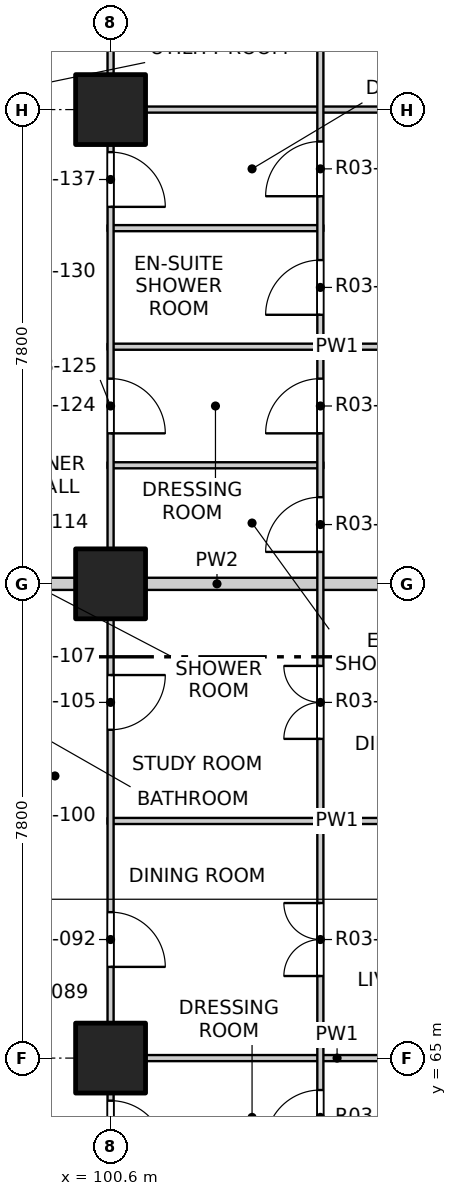
"""IFC4 building model, lengths in metres.
Left out: names, types, materials, properties, quantities, classifications, styles, units other than length and angle.
Written with IfcOpenShell. Run it as: python <this file> out.ifc"""

import sys

from ifc_helpers import new_model, si_unit, direction, frame, frame_2d, origin, origin_2d, place, context, subcontext, project, spatial, rectangle, extrude, element, fill, save


model = new_model("IFC4")
c1 = context("Model", 3, precision=1e-05, world=origin(), true_north=direction((0.0, 1.0)))
c2 = subcontext(c1, "Body", "Model", "MODEL_VIEW")
j1 = project(units=[si_unit("LENGTHUNIT", "METRE"), si_unit("PLANEANGLEUNIT", "RADIAN")], contexts=[c1])
p1 = place(None, origin())
s1 = spatial("IfcSite", under=j1, at=p1, CompositionType="ELEMENT")
p2 = place(p1, origin())
s2 = spatial("IfcBuilding", under=s1, at=p2, CompositionType="ELEMENT")
p3 = place(p2, frame((0.0, 0.0, 43.3)))
s3 = spatial("IfcBuildingStorey", under=s2, at=p3, CompositionType="ELEMENT", Elevation=43.3)
for number, where, z_axis, x_axis in (
    (1, (100.6, 65.0, -0.25), (0.0, 0.0, 1.0), (1.0, 0.0, 0.0)),
    (2, (100.6, 72.8, -0.25), (0.0, 0.0, 1.0), (1.0, 0.0, 0.0)),
    (3, (100.6, 80.6, -0.25), (0.0, 0.0, 1.0), (1.0, 0.0, 0.0)),
):
    element("IfcColumn", number, at=place(p3, frame(where, z_axis=z_axis, x_axis=x_axis)), inside=s3, PredefinedType="COLUMN", context=c2, shape_type="SweptSolid", body=[
        extrude(rectangle(XDim=1.15, YDim=1.15, at=origin_2d()), origin(), (0.0, 0.0, 1.0), 3.35),
    ])
for number, where, z_axis, x_axis in (
    (4, (100.55, 65.0, 0.0), (0.0, 0.0, 1.0), (1.0, 0.0, 0.0)),
    (5, (100.55, 68.9, 0.0), (0.0, 0.0, 1.0), (1.0, 0.0, 0.0)),
):
    element("IfcWall", number, at=place(p3, frame(where, z_axis=z_axis, x_axis=x_axis)), inside=s3, PredefinedType="PARTITIONING", context=c2, shape_type="SweptSolid", body=[
        extrude(rectangle(XDim=7.55, YDim=0.1, at=frame_2d((3.775, 0.0))), origin(), (0.0, 0.0, 1.0), 3.1),
    ])
p4 = place(p3, frame((96.6, 72.8, 0.0), z_axis=(0.0, 0.0, 1.0), x_axis=(1.0, 0.0, 0.0)))
e6 = element("IfcWall", 6, at=p4, inside=s3, PredefinedType="PARTITIONING", context=c2, shape_type="SweptSolid", body=[
    extrude(rectangle(XDim=11.5, YDim=0.2, at=frame_2d((5.75, 0.0))), origin(), (0.0, 0.0, 1.0), 3.1),
])
p5 = place(p3, frame((100.55, 74.75, 0.0), z_axis=(0.0, 0.0, 1.0), x_axis=(1.0, 0.0, 0.0)))
e7 = element("IfcWall", 7, at=p5, inside=s3, PredefinedType="PARTITIONING", context=c2, shape_type="SweptSolid", body=[
    extrude(rectangle(XDim=3.55, YDim=0.1, at=frame_2d((1.775, 0.0))), origin(), (0.0, 0.0, 1.0), 3.1),
])
p6 = place(p3, frame((100.55, 76.7, 0.0), z_axis=(0.0, 0.0, 1.0), x_axis=(1.0, 0.0, 0.0)))
e8 = element("IfcWall", 8, at=p6, inside=s3, PredefinedType="PARTITIONING", context=c2, shape_type="SweptSolid", body=[
    extrude(rectangle(XDim=7.55, YDim=0.1, at=frame_2d((3.775, 0.0))), origin(), (0.0, 0.0, 1.0), 3.1),
])
p7 = place(p3, frame((100.55, 78.65, 0.0), z_axis=(0.0, 0.0, 1.0), x_axis=(1.0, 0.0, 0.0)))
e9 = element("IfcWall", 9, at=p7, inside=s3, PredefinedType="PARTITIONING", context=c2, shape_type="SweptSolid", body=[
    extrude(rectangle(XDim=3.55, YDim=0.1, at=frame_2d((1.775, 0.0))), origin(), (0.0, 0.0, 1.0), 3.1),
])
p8 = place(p3, frame((100.55, 80.6, 0.0), z_axis=(0.0, 0.0, 1.0), x_axis=(1.0, 0.0, 0.0)))
e10 = element("IfcWall", 10, at=p8, inside=s3, PredefinedType="PARTITIONING", context=c2, shape_type="SweptSolid", body=[
    extrude(rectangle(XDim=7.55, YDim=0.1, at=frame_2d((3.775, 0.0))), origin(), (0.0, 0.0, 1.0), 3.1),
])
p9 = place(p3, frame((100.6, 41.9, 0.0), z_axis=(0.0, 0.0, 1.0), x_axis=(0.0, 1.0, 0.0)))
e11 = element("IfcWall", 11, at=p9, inside=s3, PredefinedType="PARTITIONING", context=c2, shape_type="SweptSolid", body=[
    extrude(rectangle(XDim=46.2, YDim=0.1, at=frame_2d((23.1, 0.0))), origin(), (0.0, 0.0, 1.0), 3.1),
])
p10 = place(p9, frame((1.2, 0.0, 0.0)))
e12 = element("IfcOpeningElement", 12, at=p10, cuts=e11, PredefinedType="OPENING", context=c2, shape_type="SweptSolid", body=[
    extrude(rectangle(XDim=0.9, YDim=2.1, at=frame_2d((0.45, 1.05))), frame((0.0, 0.06, 0.0), z_axis=(0.0, -1.0, 0.0), x_axis=(1.0, 0.0, 0.0)), (0.0, 0.0, 1.0), 0.12),
])
p11 = place(p9, frame((5.9, 0.0, 0.0)))
e13 = element("IfcOpeningElement", 13, at=p11, cuts=e11, PredefinedType="OPENING", context=c2, shape_type="SweptSolid", body=[
    extrude(rectangle(XDim=0.9, YDim=2.1, at=frame_2d((0.45, 1.05))), frame((0.0, 0.06, 0.0), z_axis=(0.0, -1.0, 0.0), x_axis=(1.0, 0.0, 0.0)), (0.0, 0.0, 1.0), 0.12),
])
p12 = place(p9, frame((9.0, 0.0, 0.0)))
e14 = element("IfcOpeningElement", 14, at=p12, cuts=e11, PredefinedType="OPENING", context=c2, shape_type="SweptSolid", body=[
    extrude(rectangle(XDim=0.9, YDim=2.1, at=frame_2d((0.45, 1.05))), frame((0.0, 0.06, 0.0), z_axis=(0.0, -1.0, 0.0), x_axis=(1.0, 0.0, 0.0)), (0.0, 0.0, 1.0), 0.12),
])
p13 = place(p9, frame((13.725, 0.0, 0.0)))
e15 = element("IfcOpeningElement", 15, at=p13, cuts=e11, PredefinedType="OPENING", context=c2, shape_type="SweptSolid", body=[
    extrude(rectangle(XDim=0.9, YDim=2.1, at=frame_2d((0.45, 1.05))), frame((0.0, 0.06, 0.0), z_axis=(0.0, -1.0, 0.0), x_axis=(1.0, 0.0, 0.0)), (0.0, 0.0, 1.0), 0.12),
])
p14 = place(p9, frame((17.775, 0.0, 0.0)))
e16 = element("IfcOpeningElement", 16, at=p14, cuts=e11, PredefinedType="OPENING", context=c2, shape_type="SweptSolid", body=[
    extrude(rectangle(XDim=0.9, YDim=2.1, at=frame_2d((0.45, 1.05))), frame((0.0, 0.06, 0.0), z_axis=(0.0, -1.0, 0.0), x_axis=(1.0, 0.0, 0.0)), (0.0, 0.0, 1.0), 0.12),
])
p15 = place(p9, frame((21.5, 0.0, 0.0)))
e17 = element("IfcOpeningElement", 17, at=p15, cuts=e11, PredefinedType="OPENING", context=c2, shape_type="SweptSolid", body=[
    extrude(rectangle(XDim=0.9, YDim=2.1, at=frame_2d((0.45, 1.05))), frame((0.0, 0.06, 0.0), z_axis=(0.0, -1.0, 0.0), x_axis=(1.0, 0.0, 0.0)), (0.0, 0.0, 1.0), 0.12),
])
p16 = place(p9, frame((24.6, 0.0, 0.0)))
e18 = element("IfcOpeningElement", 18, at=p16, cuts=e11, PredefinedType="OPENING", context=c2, shape_type="SweptSolid", body=[
    extrude(rectangle(XDim=0.9, YDim=2.1, at=frame_2d((0.45, 1.05))), frame((0.0, 0.06, 0.0), z_axis=(0.0, -1.0, 0.0), x_axis=(1.0, 0.0, 0.0)), (0.0, 0.0, 1.0), 0.12),
])
p17 = place(p9, frame((28.5, 0.0, 0.0)))
e19 = element("IfcOpeningElement", 19, at=p17, cuts=e11, PredefinedType="OPENING", context=c2, shape_type="SweptSolid", body=[
    extrude(rectangle(XDim=0.9, YDim=2.1, at=frame_2d((0.45, 1.05))), frame((0.0, 0.06, 0.0), z_axis=(0.0, -1.0, 0.0), x_axis=(1.0, 0.0, 0.0)), (0.0, 0.0, 1.0), 0.12),
])
p18 = place(p9, frame((33.375, 0.0, 0.0)))
e20 = element("IfcOpeningElement", 20, at=p18, cuts=e11, PredefinedType="OPENING", context=c2, shape_type="SweptSolid", body=[
    extrude(rectangle(XDim=0.9, YDim=2.1, at=frame_2d((0.45, 1.05))), frame((0.0, 0.06, 0.0), z_axis=(0.0, -1.0, 0.0), x_axis=(1.0, 0.0, 0.0)), (0.0, 0.0, 1.0), 0.12),
])
p19 = place(p9, frame((37.1, 0.0, 0.0)))
e21 = element("IfcOpeningElement", 21, at=p19, cuts=e11, PredefinedType="OPENING", context=c2, shape_type="SweptSolid", body=[
    extrude(rectangle(XDim=0.9, YDim=2.1, at=frame_2d((0.45, 1.05))), frame((0.0, 0.06, 0.0), z_axis=(0.0, -1.0, 0.0), x_axis=(1.0, 0.0, 0.0)), (0.0, 0.0, 1.0), 0.12),
])
p20 = place(p9, frame((40.2, 0.0, 0.0)))
e22 = element("IfcOpeningElement", 22, at=p20, cuts=e11, PredefinedType="OPENING", context=c2, shape_type="SweptSolid", body=[
    extrude(rectangle(XDim=0.9, YDim=2.1, at=frame_2d((0.45, 1.05))), frame((0.0, 0.06, 0.0), z_axis=(0.0, -1.0, 0.0), x_axis=(1.0, 0.0, 0.0)), (0.0, 0.0, 1.0), 0.12),
])
p21 = place(p9, frame((44.1, 0.0, 0.0)))
e23 = element("IfcOpeningElement", 23, at=p21, cuts=e11, PredefinedType="OPENING", context=c2, shape_type="SweptSolid", body=[
    extrude(rectangle(XDim=0.9, YDim=2.1, at=frame_2d((0.45, 1.05))), frame((0.0, 0.06, 0.0), z_axis=(0.0, -1.0, 0.0), x_axis=(1.0, 0.0, 0.0)), (0.0, 0.0, 1.0), 0.12),
])
p22 = place(p3, frame((104.05, 41.9, 0.0), z_axis=(0.0, 0.0, 1.0), x_axis=(0.0, 1.0, 0.0)))
e24 = element("IfcWall", 24, at=p22, inside=s3, PredefinedType="PARTITIONING", context=c2, shape_type="SweptSolid", body=[
    extrude(rectangle(XDim=46.2, YDim=0.1, at=frame_2d((23.1, 0.0))), origin(), (0.0, 0.0, 1.0), 3.1),
])
p23 = place(p22, frame((1.05, 0.0, 0.0)))
e25 = element("IfcOpeningElement", 25, at=p23, cuts=e24, PredefinedType="OPENING", context=c2, shape_type="SweptSolid", body=[
    extrude(rectangle(XDim=1.2, YDim=2.1, at=frame_2d((0.6, 1.05))), frame((0.0, 0.06, 0.0), z_axis=(0.0, -1.0, 0.0), x_axis=(1.0, 0.0, 0.0)), (0.0, 0.0, 1.0), 0.12),
])
p24 = place(p22, frame((4.125, 0.0, 0.0)))
e26 = element("IfcOpeningElement", 26, at=p24, cuts=e24, PredefinedType="OPENING", context=c2, shape_type="SweptSolid", body=[
    extrude(rectangle(XDim=0.9, YDim=2.1, at=frame_2d((0.45, 1.05))), frame((0.0, 0.06, 0.0), z_axis=(0.0, -1.0, 0.0), x_axis=(1.0, 0.0, 0.0)), (0.0, 0.0, 1.0), 0.12),
])
p25 = place(p22, frame((6.075, 0.0, 0.0)))
e27 = element("IfcOpeningElement", 27, at=p25, cuts=e24, PredefinedType="OPENING", context=c2, shape_type="SweptSolid", body=[
    extrude(rectangle(XDim=0.9, YDim=2.1, at=frame_2d((0.45, 1.05))), frame((0.0, 0.06, 0.0), z_axis=(0.0, -1.0, 0.0), x_axis=(1.0, 0.0, 0.0)), (0.0, 0.0, 1.0), 0.12),
])
p26 = place(p22, frame((8.85, 0.0, 0.0)))
e28 = element("IfcOpeningElement", 28, at=p26, cuts=e24, PredefinedType="OPENING", context=c2, shape_type="SweptSolid", body=[
    extrude(rectangle(XDim=1.2, YDim=2.1, at=frame_2d((0.6, 1.05))), frame((0.0, 0.06, 0.0), z_axis=(0.0, -1.0, 0.0), x_axis=(1.0, 0.0, 0.0)), (0.0, 0.0, 1.0), 0.12),
])
p27 = place(p22, frame((11.925, 0.0, 0.0)))
e29 = element("IfcOpeningElement", 29, at=p27, cuts=e24, PredefinedType="OPENING", context=c2, shape_type="SweptSolid", body=[
    extrude(rectangle(XDim=0.9, YDim=2.1, at=frame_2d((0.45, 1.05))), frame((0.0, 0.06, 0.0), z_axis=(0.0, -1.0, 0.0), x_axis=(1.0, 0.0, 0.0)), (0.0, 0.0, 1.0), 0.12),
])
p28 = place(p22, frame((13.875, 0.0, 0.0)))
e30 = element("IfcOpeningElement", 30, at=p28, cuts=e24, PredefinedType="OPENING", context=c2, shape_type="SweptSolid", body=[
    extrude(rectangle(XDim=0.9, YDim=2.1, at=frame_2d((0.45, 1.05))), frame((0.0, 0.06, 0.0), z_axis=(0.0, -1.0, 0.0), x_axis=(1.0, 0.0, 0.0)), (0.0, 0.0, 1.0), 0.12),
])
p29 = place(p22, frame((15.825, 0.0, 0.0)))
e31 = element("IfcOpeningElement", 31, at=p29, cuts=e24, PredefinedType="OPENING", context=c2, shape_type="SweptSolid", body=[
    extrude(rectangle(XDim=0.9, YDim=2.1, at=frame_2d((0.45, 1.05))), frame((0.0, 0.06, 0.0), z_axis=(0.0, -1.0, 0.0), x_axis=(1.0, 0.0, 0.0)), (0.0, 0.0, 1.0), 0.12),
])
p30 = place(p22, frame((17.775, 0.0, 0.0)))
e32 = element("IfcOpeningElement", 32, at=p30, cuts=e24, PredefinedType="OPENING", context=c2, shape_type="SweptSolid", body=[
    extrude(rectangle(XDim=0.9, YDim=2.1, at=frame_2d((0.45, 1.05))), frame((0.0, 0.06, 0.0), z_axis=(0.0, -1.0, 0.0), x_axis=(1.0, 0.0, 0.0)), (0.0, 0.0, 1.0), 0.12),
])
p31 = place(p22, frame((19.725, 0.0, 0.0)))
e33 = element("IfcOpeningElement", 33, at=p31, cuts=e24, PredefinedType="OPENING", context=c2, shape_type="SweptSolid", body=[
    extrude(rectangle(XDim=0.9, YDim=2.1, at=frame_2d((0.45, 1.05))), frame((0.0, 0.06, 0.0), z_axis=(0.0, -1.0, 0.0), x_axis=(1.0, 0.0, 0.0)), (0.0, 0.0, 1.0), 0.12),
])
p32 = place(p22, frame((21.675, 0.0, 0.0)))
e34 = element("IfcOpeningElement", 34, at=p32, cuts=e24, PredefinedType="OPENING", context=c2, shape_type="SweptSolid", body=[
    extrude(rectangle(XDim=0.9, YDim=2.1, at=frame_2d((0.45, 1.05))), frame((0.0, 0.06, 0.0), z_axis=(0.0, -1.0, 0.0), x_axis=(1.0, 0.0, 0.0)), (0.0, 0.0, 1.0), 0.12),
])
p33 = place(p22, frame((24.45, 0.0, 0.0)))
e35 = element("IfcOpeningElement", 35, at=p33, cuts=e24, PredefinedType="OPENING", context=c2, shape_type="SweptSolid", body=[
    extrude(rectangle(XDim=1.2, YDim=2.1, at=frame_2d((0.6, 1.05))), frame((0.0, 0.06, 0.0), z_axis=(0.0, -1.0, 0.0), x_axis=(1.0, 0.0, 0.0)), (0.0, 0.0, 1.0), 0.12),
])
p34 = place(p22, frame((28.35, 0.0, 0.0)))
e36 = element("IfcOpeningElement", 36, at=p34, cuts=e24, PredefinedType="OPENING", context=c2, shape_type="SweptSolid", body=[
    extrude(rectangle(XDim=1.2, YDim=2.1, at=frame_2d((0.6, 1.05))), frame((0.0, 0.06, 0.0), z_axis=(0.0, -1.0, 0.0), x_axis=(1.0, 0.0, 0.0)), (0.0, 0.0, 1.0), 0.12),
])
p35 = place(p22, frame((31.425, 0.0, 0.0)))
e37 = element("IfcOpeningElement", 37, at=p35, cuts=e24, PredefinedType="OPENING", context=c2, shape_type="SweptSolid", body=[
    extrude(rectangle(XDim=0.9, YDim=2.1, at=frame_2d((0.45, 1.05))), frame((0.0, 0.06, 0.0), z_axis=(0.0, -1.0, 0.0), x_axis=(1.0, 0.0, 0.0)), (0.0, 0.0, 1.0), 0.12),
])
p36 = place(p22, frame((33.375, 0.0, 0.0)))
e38 = element("IfcOpeningElement", 38, at=p36, cuts=e24, PredefinedType="OPENING", context=c2, shape_type="SweptSolid", body=[
    extrude(rectangle(XDim=0.9, YDim=2.1, at=frame_2d((0.45, 1.05))), frame((0.0, 0.06, 0.0), z_axis=(0.0, -1.0, 0.0), x_axis=(1.0, 0.0, 0.0)), (0.0, 0.0, 1.0), 0.12),
])
p37 = place(p22, frame((35.325, 0.0, 0.0)))
e39 = element("IfcOpeningElement", 39, at=p37, cuts=e24, PredefinedType="OPENING", context=c2, shape_type="SweptSolid", body=[
    extrude(rectangle(XDim=0.9, YDim=2.1, at=frame_2d((0.45, 1.05))), frame((0.0, 0.06, 0.0), z_axis=(0.0, -1.0, 0.0), x_axis=(1.0, 0.0, 0.0)), (0.0, 0.0, 1.0), 0.12),
])
p38 = place(p22, frame((37.275, 0.0, 0.0)))
e40 = element("IfcOpeningElement", 40, at=p38, cuts=e24, PredefinedType="OPENING", context=c2, shape_type="SweptSolid", body=[
    extrude(rectangle(XDim=0.9, YDim=2.1, at=frame_2d((0.45, 1.05))), frame((0.0, 0.06, 0.0), z_axis=(0.0, -1.0, 0.0), x_axis=(1.0, 0.0, 0.0)), (0.0, 0.0, 1.0), 0.12),
])
p39 = place(p22, frame((40.05, 0.0, 0.0)))
e41 = element("IfcOpeningElement", 41, at=p39, cuts=e24, PredefinedType="OPENING", context=c2, shape_type="SweptSolid", body=[
    extrude(rectangle(XDim=1.2, YDim=2.1, at=frame_2d((0.6, 1.05))), frame((0.0, 0.06, 0.0), z_axis=(0.0, -1.0, 0.0), x_axis=(1.0, 0.0, 0.0)), (0.0, 0.0, 1.0), 0.12),
])
p40 = place(p22, frame((43.95, 0.0, 0.0)))
e42 = element("IfcOpeningElement", 42, at=p40, cuts=e24, PredefinedType="OPENING", context=c2, shape_type="SweptSolid", body=[
    extrude(rectangle(XDim=1.2, YDim=2.1, at=frame_2d((0.6, 1.05))), frame((0.0, 0.06, 0.0), z_axis=(0.0, -1.0, 0.0), x_axis=(1.0, 0.0, 0.0)), (0.0, 0.0, 1.0), 0.12),
])
p41 = place(p15, origin())
e43 = element("IfcDoor", 43, at=p41, inside=s3, OperationType="SINGLE_SWING_RIGHT", PredefinedType="DOOR", context=c2, shape_type="SweptSolid", body=[
    extrude(rectangle(XDim=0.9, YDim=2.1, at=frame_2d((0.45, 1.05))), frame((0.0, 0.025, 0.0), z_axis=(0.0, -1.0, 0.0), x_axis=(1.0, 0.0, 0.0)), (0.0, 0.0, 1.0), 0.05),
])
fill(e17, e43)
p42 = place(p32, origin())
e44 = element("IfcDoor", 44, at=p42, inside=s3, OperationType="SINGLE_SWING_LEFT", PredefinedType="DOOR", context=c2, shape_type="SweptSolid", body=[
    extrude(rectangle(XDim=0.9, YDim=2.1, at=frame_2d((0.45, 1.05))), frame((0.0, 0.025, 0.0), z_axis=(0.0, -1.0, 0.0), x_axis=(1.0, 0.0, 0.0)), (0.0, 0.0, 1.0), 0.05),
])
fill(e34, e44)
p43 = place(p16, origin())
e45 = element("IfcDoor", 45, at=p43, inside=s3, OperationType="SINGLE_SWING_RIGHT", PredefinedType="DOOR", context=c2, shape_type="SweptSolid", body=[
    extrude(rectangle(XDim=0.9, YDim=2.1, at=frame_2d((0.45, 1.05))), frame((0.0, 0.025, 0.0), z_axis=(0.0, -1.0, 0.0), x_axis=(1.0, 0.0, 0.0)), (0.0, 0.0, 1.0), 0.05),
])
fill(e18, e45)
p44 = place(p33, origin())
e46 = element("IfcDoor", 46, at=p44, inside=s3, OperationType="DOUBLE_DOOR_SINGLE_SWING", PredefinedType="DOOR", context=c2, shape_type="SweptSolid", body=[
    extrude(rectangle(XDim=1.2, YDim=2.1, at=frame_2d((0.6, 1.05))), frame((0.0, 0.025, 0.0), z_axis=(0.0, -1.0, 0.0), x_axis=(1.0, 0.0, 0.0)), (0.0, 0.0, 1.0), 0.05),
])
fill(e35, e46)
p45 = place(p17, origin())
e47 = element("IfcDoor", 47, at=p45, inside=s3, OperationType="SINGLE_SWING_LEFT", PredefinedType="DOOR", context=c2, shape_type="SweptSolid", body=[
    extrude(rectangle(XDim=0.9, YDim=2.1, at=frame_2d((0.45, 1.05))), frame((0.0, 0.025, 0.0), z_axis=(0.0, -1.0, 0.0), x_axis=(1.0, 0.0, 0.0)), (0.0, 0.0, 1.0), 0.05),
])
fill(e19, e47)
p46 = place(p34, origin())
e48 = element("IfcDoor", 48, at=p46, inside=s3, OperationType="DOUBLE_DOOR_SINGLE_SWING", PredefinedType="DOOR", context=c2, shape_type="SweptSolid", body=[
    extrude(rectangle(XDim=1.2, YDim=2.1, at=frame_2d((0.6, 1.05))), frame((0.0, 0.025, 0.0), z_axis=(0.0, -1.0, 0.0), x_axis=(1.0, 0.0, 0.0)), (0.0, 0.0, 1.0), 0.05),
])
fill(e36, e48)
p47 = place(p35, origin())
e49 = element("IfcDoor", 49, at=p47, inside=s3, OperationType="SINGLE_SWING_LEFT", PredefinedType="DOOR", context=c2, shape_type="SweptSolid", body=[
    extrude(rectangle(XDim=0.9, YDim=2.1, at=frame_2d((0.45, 1.05))), frame((0.0, 0.025, 0.0), z_axis=(0.0, -1.0, 0.0), x_axis=(1.0, 0.0, 0.0)), (0.0, 0.0, 1.0), 0.05),
])
fill(e37, e49)
p48 = place(p18, origin())
e50 = element("IfcDoor", 50, at=p48, inside=s3, OperationType="SINGLE_SWING_RIGHT", PredefinedType="DOOR", context=c2, shape_type="SweptSolid", body=[
    extrude(rectangle(XDim=0.9, YDim=2.1, at=frame_2d((0.45, 1.05))), frame((0.0, 0.025, 0.0), z_axis=(0.0, -1.0, 0.0), x_axis=(1.0, 0.0, 0.0)), (0.0, 0.0, 1.0), 0.05),
])
fill(e20, e50)
p49 = place(p36, origin())
e51 = element("IfcDoor", 51, at=p49, inside=s3, OperationType="SINGLE_SWING_LEFT", PredefinedType="DOOR", context=c2, shape_type="SweptSolid", body=[
    extrude(rectangle(XDim=0.9, YDim=2.1, at=frame_2d((0.45, 1.05))), frame((0.0, 0.025, 0.0), z_axis=(0.0, -1.0, 0.0), x_axis=(1.0, 0.0, 0.0)), (0.0, 0.0, 1.0), 0.05),
])
fill(e38, e51)
p50 = place(p37, origin())
e52 = element("IfcDoor", 52, at=p50, inside=s3, OperationType="SINGLE_SWING_LEFT", PredefinedType="DOOR", context=c2, shape_type="SweptSolid", body=[
    extrude(rectangle(XDim=0.9, YDim=2.1, at=frame_2d((0.45, 1.05))), frame((0.0, 0.025, 0.0), z_axis=(0.0, -1.0, 0.0), x_axis=(1.0, 0.0, 0.0)), (0.0, 0.0, 1.0), 0.05),
])
fill(e39, e52)
p51 = place(p19, origin())
e53 = element("IfcDoor", 53, at=p51, inside=s3, OperationType="SINGLE_SWING_RIGHT", PredefinedType="DOOR", context=c2, shape_type="SweptSolid", body=[
    extrude(rectangle(XDim=0.9, YDim=2.1, at=frame_2d((0.45, 1.05))), frame((0.0, 0.025, 0.0), z_axis=(0.0, -1.0, 0.0), x_axis=(1.0, 0.0, 0.0)), (0.0, 0.0, 1.0), 0.05),
])
fill(e21, e53)
p52 = place(p38, origin())
e54 = element("IfcDoor", 54, at=p52, inside=s3, OperationType="SINGLE_SWING_LEFT", PredefinedType="DOOR", context=c2, shape_type="SweptSolid", body=[
    extrude(rectangle(XDim=0.9, YDim=2.1, at=frame_2d((0.45, 1.05))), frame((0.0, 0.025, 0.0), z_axis=(0.0, -1.0, 0.0), x_axis=(1.0, 0.0, 0.0)), (0.0, 0.0, 1.0), 0.05),
])
fill(e40, e54)
save(model, sys.argv[1])
